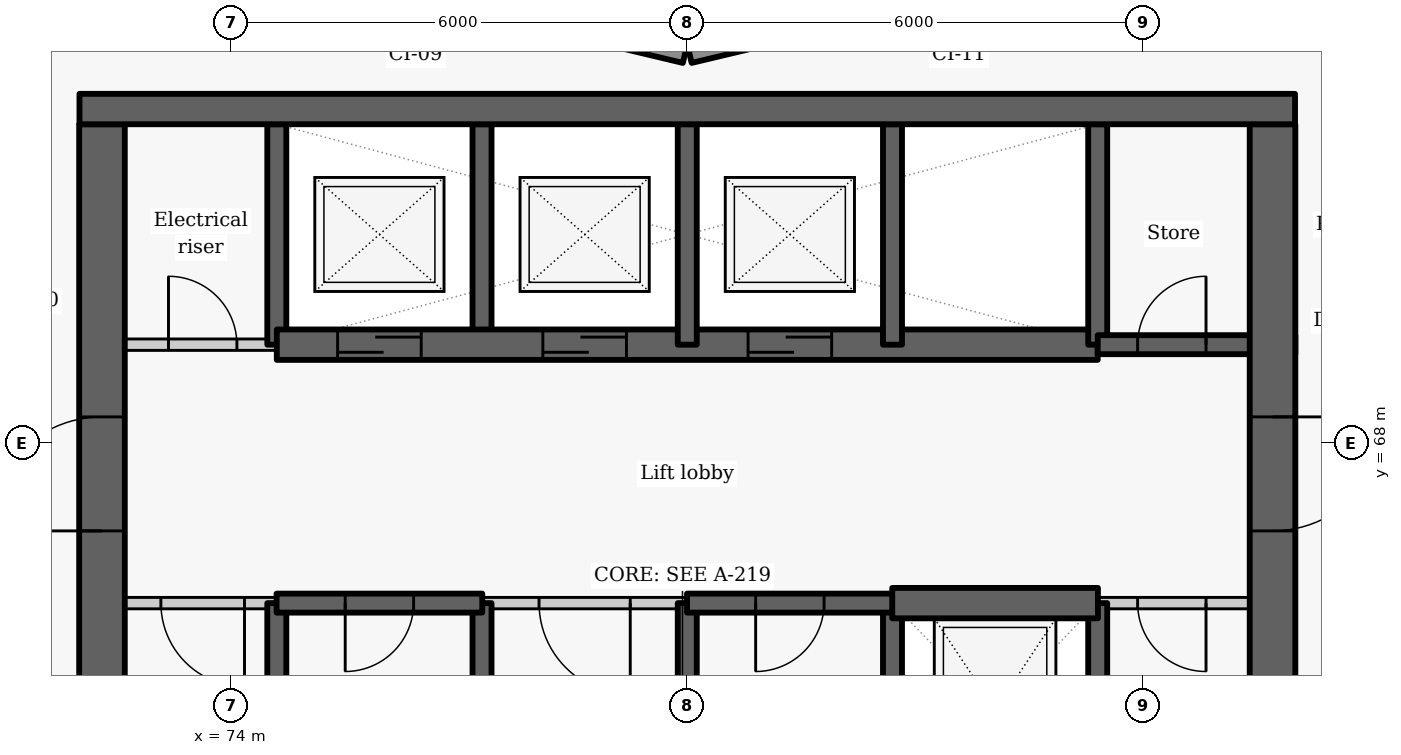
"""IFC4 building model, lengths in metres.
Left out: names, types, materials, properties, quantities, classifications, styles, units other than length and angle.
Written with IfcOpenShell. Run it as: python <this file> out.ifc"""

import sys

from ifc_helpers import new_model, si_unit, direction, frame, frame_2d, origin, place, context, subcontext, project, spatial, rectangle, extrude, element, fill, save


model = new_model("IFC4")
c1 = context("Model", 3, precision=1e-05, world=origin(), true_north=direction((0.0, 1.0)))
c2 = subcontext(c1, "Body", "Model", "MODEL_VIEW")
j1 = project(units=[si_unit("LENGTHUNIT", "METRE"), si_unit("PLANEANGLEUNIT", "RADIAN")], contexts=[c1])
p1 = place(None, origin())
s1 = spatial("IfcSite", under=j1, at=p1, CompositionType="ELEMENT")
p2 = place(p1, origin())
s2 = spatial("IfcBuilding", under=s1, at=p2, CompositionType="ELEMENT")
p3 = place(p2, frame((0.0, 0.0, 97.5)))
s3 = spatial("IfcBuildingStorey", under=s2, at=p3, CompositionType="ELEMENT", Elevation=97.5)
for number, where, z_axis, x_axis in (
    (1, (83.186, 73.881, 0.0), (0.0, 0.0, 1.0), (-0.973, -0.232, 0.0)),
    (2, (79.971, 73.128, 0.0), (0.0, 0.0, 1.0), (-0.973, 0.232, 0.0)),
):
    element("IfcWall", number, at=place(p3, frame(where, z_axis=z_axis, x_axis=x_axis)), inside=s3, PredefinedType="SOLIDWALL", context=c2, shape_type="SweptSolid", body=[
        extrude(rectangle(XDim=3.246, YDim=0.25, at=frame_2d((1.623, 0.0))), origin(), (0.0, 0.0, 1.0), 2.425),
    ])
p4 = place(p3, frame((74.6, 63.1, -0.275), z_axis=(0.0, 0.0, 1.0), x_axis=(0.0, 1.0, 0.0)))
e3 = element("IfcWall", 3, at=p4, inside=s3, PredefinedType="SHEAR", context=c2, shape_type="SweptSolid", body=[
    extrude(rectangle(XDim=2.8, YDim=0.25, at=frame_2d((1.4, 0.0))), origin(), (0.0, 0.0, 1.0), 3.3),
])
p5 = place(p3, frame((74.6, 69.3, -0.275), z_axis=(0.0, 0.0, 1.0), x_axis=(0.0, 1.0, 0.0)))
e4 = element("IfcWall", 4, at=p5, inside=s3, PredefinedType="SHEAR", context=c2, shape_type="SweptSolid", body=[
    extrude(rectangle(XDim=2.9, YDim=0.25, at=frame_2d((1.45, 0.0))), origin(), (0.0, 0.0, 1.0), 3.3),
])
p6 = place(p3, frame((72.0, 69.3, 0.0), z_axis=(0.0, 0.0, 1.0), x_axis=(1.0, 0.0, 0.0)))
e5 = element("IfcWall", 5, at=p6, inside=s3, PredefinedType="PARTITIONING", context=c2, shape_type="SweptSolid", body=[
    extrude(rectangle(XDim=2.6, YDim=0.15, at=frame_2d((1.3, 0.0))), origin(), (0.0, 0.0, 1.0), 3.025),
])
p7 = place(p6, frame((1.175, 0.0, 0.0)))
e6 = element("IfcOpeningElement", 6, at=p7, cuts=e5, PredefinedType="OPENING", context=c2, shape_type="SweptSolid", body=[
    extrude(rectangle(XDim=0.9, YDim=2.1, at=frame_2d((0.45, 1.05))), frame((0.0, 0.085, 0.0), z_axis=(0.0, -1.0, 0.0), x_axis=(1.0, 0.0, 0.0)), (0.0, 0.0, 1.0), 0.17),
])
p8 = place(p3, frame((72.3, 63.1, -0.275), z_axis=(0.0, 0.0, 1.0), x_axis=(0.0, 1.0, 0.0)))
e7 = element("IfcWall", 7, at=p8, inside=s3, PredefinedType="SHEAR", context=c2, shape_type="SweptSolid", body=[
    extrude(rectangle(XDim=9.1, YDim=0.6, at=frame_2d((4.55, 0.0))), origin(), (0.0, 0.0, 1.0), 3.3),
])
p9 = place(p8, frame((3.75, 0.0, 0.275)))
e8 = element("IfcOpeningElement", 8, at=p9, cuts=e7, PredefinedType="OPENING", context=c2, shape_type="SweptSolid", body=[
    extrude(rectangle(XDim=1.5, YDim=2.1, at=frame_2d((0.75, 1.05))), frame((0.0, 0.31, 0.0), z_axis=(0.0, -1.0, 0.0), x_axis=(1.0, 0.0, 0.0)), (0.0, 0.0, 1.0), 0.62),
])
p10 = place(p3, frame((77.3, 63.1, -0.275), z_axis=(0.0, 0.0, 1.0), x_axis=(0.0, 1.0, 0.0)))
e9 = element("IfcWall", 9, at=p10, inside=s3, PredefinedType="SHEAR", context=c2, shape_type="SweptSolid", body=[
    extrude(rectangle(XDim=2.8, YDim=0.25, at=frame_2d((1.4, 0.0))), origin(), (0.0, 0.0, 1.0), 3.3),
])
p11 = place(p3, frame((77.3, 69.3, -0.275), z_axis=(0.0, 0.0, 1.0), x_axis=(0.0, 1.0, 0.0)))
e10 = element("IfcWall", 10, at=p11, inside=s3, PredefinedType="SHEAR", context=c2, shape_type="SweptSolid", body=[
    extrude(rectangle(XDim=2.9, YDim=0.25, at=frame_2d((1.45, 0.0))), origin(), (0.0, 0.0, 1.0), 3.3),
])
p12 = place(p3, frame((74.6, 69.3, -0.275), z_axis=(0.0, 0.0, 1.0), x_axis=(1.0, 0.0, 0.0)))
e11 = element("IfcWall", 11, at=p12, inside=s3, PredefinedType="SHEAR", context=c2, shape_type="SweptSolid", body=[
    extrude(rectangle(XDim=10.8, YDim=0.4, at=frame_2d((5.4, 0.0))), origin(), (0.0, 0.0, 1.0), 3.3),
])
p13 = place(p12, frame((0.8, 0.0, 0.275)))
e12 = element("IfcOpeningElement", 12, at=p13, cuts=e11, PredefinedType="OPENING", context=c2, shape_type="SweptSolid", body=[
    extrude(rectangle(XDim=1.1, YDim=2.1, at=frame_2d((0.55, 1.05))), frame((0.0, 0.21, 0.0), z_axis=(0.0, -1.0, 0.0), x_axis=(1.0, 0.0, 0.0)), (0.0, 0.0, 1.0), 0.42),
])
p14 = place(p12, frame((3.5, 0.0, 0.275)))
e13 = element("IfcOpeningElement", 13, at=p14, cuts=e11, PredefinedType="OPENING", context=c2, shape_type="SweptSolid", body=[
    extrude(rectangle(XDim=1.1, YDim=2.1, at=frame_2d((0.55, 1.05))), frame((0.0, 0.21, 0.0), z_axis=(0.0, -1.0, 0.0), x_axis=(1.0, 0.0, 0.0)), (0.0, 0.0, 1.0), 0.42),
])
p15 = place(p12, frame((6.2, 0.0, 0.275)))
e14 = element("IfcOpeningElement", 14, at=p15, cuts=e11, PredefinedType="OPENING", context=c2, shape_type="SweptSolid", body=[
    extrude(rectangle(XDim=1.1, YDim=2.1, at=frame_2d((0.55, 1.05))), frame((0.0, 0.21, 0.0), z_axis=(0.0, -1.0, 0.0), x_axis=(1.0, 0.0, 0.0)), (0.0, 0.0, 1.0), 0.42),
])
p16 = place(p3, frame((80.0, 63.1, -0.275), z_axis=(0.0, 0.0, 1.0), x_axis=(0.0, 1.0, 0.0)))
e15 = element("IfcWall", 15, at=p16, inside=s3, PredefinedType="SHEAR", context=c2, shape_type="SweptSolid", body=[
    extrude(rectangle(XDim=2.8, YDim=0.25, at=frame_2d((1.4, 0.0))), origin(), (0.0, 0.0, 1.0), 3.3),
])
p17 = place(p3, frame((80.0, 69.3, -0.275), z_axis=(0.0, 0.0, 1.0), x_axis=(0.0, 1.0, 0.0)))
e16 = element("IfcWall", 16, at=p17, inside=s3, PredefinedType="SHEAR", context=c2, shape_type="SweptSolid", body=[
    extrude(rectangle(XDim=2.9, YDim=0.25, at=frame_2d((1.45, 0.0))), origin(), (0.0, 0.0, 1.0), 3.3),
])
p18 = place(p3, frame((82.7, 63.1, -0.275), z_axis=(0.0, 0.0, 1.0), x_axis=(0.0, 1.0, 0.0)))
e17 = element("IfcWall", 17, at=p18, inside=s3, PredefinedType="SHEAR", context=c2, shape_type="SweptSolid", body=[
    extrude(rectangle(XDim=2.8, YDim=0.25, at=frame_2d((1.4, 0.0))), origin(), (0.0, 0.0, 1.0), 3.3),
])
p19 = place(p3, frame((82.7, 69.3, -0.275), z_axis=(0.0, 0.0, 1.0), x_axis=(0.0, 1.0, 0.0)))
e18 = element("IfcWall", 18, at=p19, inside=s3, PredefinedType="SHEAR", context=c2, shape_type="SweptSolid", body=[
    extrude(rectangle(XDim=2.9, YDim=0.25, at=frame_2d((1.45, 0.0))), origin(), (0.0, 0.0, 1.0), 3.3),
])
p20 = place(p3, frame((85.4, 63.1, -0.275), z_axis=(0.0, 0.0, 1.0), x_axis=(0.0, 1.0, 0.0)))
e19 = element("IfcWall", 19, at=p20, inside=s3, PredefinedType="SHEAR", context=c2, shape_type="SweptSolid", body=[
    extrude(rectangle(XDim=2.8, YDim=0.25, at=frame_2d((1.4, 0.0))), origin(), (0.0, 0.0, 1.0), 3.3),
])
p21 = place(p3, frame((85.4, 69.3, -0.275), z_axis=(0.0, 0.0, 1.0), x_axis=(0.0, 1.0, 0.0)))
e20 = element("IfcWall", 20, at=p21, inside=s3, PredefinedType="SHEAR", context=c2, shape_type="SweptSolid", body=[
    extrude(rectangle(XDim=2.9, YDim=0.25, at=frame_2d((1.45, 0.0))), origin(), (0.0, 0.0, 1.0), 3.3),
])
p22 = place(p3, frame((85.4, 69.3, -0.275), z_axis=(0.0, 0.0, 1.0), x_axis=(1.0, 0.0, 0.0)))
e21 = element("IfcWall", 21, at=p22, inside=s3, PredefinedType="SHEAR", context=c2, shape_type="SweptSolid", body=[
    extrude(rectangle(XDim=2.6, YDim=0.25, at=frame_2d((1.3, 0.0))), origin(), (0.0, 0.0, 1.0), 3.3),
])
p23 = place(p22, frame((0.525, 0.0, 0.275)))
e22 = element("IfcOpeningElement", 22, at=p23, cuts=e21, PredefinedType="OPENING", context=c2, shape_type="SweptSolid", body=[
    extrude(rectangle(XDim=0.9, YDim=2.1, at=frame_2d((0.45, 1.05))), frame((0.0, 0.135, 0.0), z_axis=(0.0, -1.0, 0.0), x_axis=(1.0, 0.0, 0.0)), (0.0, 0.0, 1.0), 0.27),
])
p24 = place(p3, frame((87.7, 72.2, -0.275), z_axis=(0.0, 0.0, 1.0), x_axis=(0.0, -1.0, 0.0)))
e23 = element("IfcWall", 23, at=p24, inside=s3, PredefinedType="SHEAR", context=c2, shape_type="SweptSolid", body=[
    extrude(rectangle(XDim=15.6, YDim=0.6, at=frame_2d((7.8, 0.0))), origin(), (0.0, 0.0, 1.0), 3.3),
])
p25 = place(p24, frame((3.85, 0.0, 0.275)))
e24 = element("IfcOpeningElement", 24, at=p25, cuts=e23, PredefinedType="OPENING", context=c2, shape_type="SweptSolid", body=[
    extrude(rectangle(XDim=1.5, YDim=2.1, at=frame_2d((0.75, 1.05))), frame((0.0, 0.31, 0.0), z_axis=(0.0, -1.0, 0.0), x_axis=(1.0, 0.0, 0.0)), (0.0, 0.0, 1.0), 0.62),
])
p26 = place(p24, frame((11.8, 0.0, 0.275)))
e25 = element("IfcOpeningElement", 25, at=p26, cuts=e23, PredefinedType="OPENING", context=c2, shape_type="SweptSolid", body=[
    extrude(rectangle(XDim=1.1, YDim=2.1, at=frame_2d((0.55, 1.05))), frame((0.0, 0.31, 0.0), z_axis=(0.0, -1.0, 0.0), x_axis=(1.0, 0.0, 0.0)), (0.0, 0.0, 1.0), 0.62),
])
p27 = place(p3, frame((74.603, 65.9, 0.0), z_axis=(0.0, 0.0, 1.0), x_axis=(-1.0, 0.0, 0.0)))
e26 = element("IfcWall", 26, at=p27, inside=s3, PredefinedType="PARTITIONING", context=c2, shape_type="SweptSolid", body=[
    extrude(rectangle(XDim=2.603, YDim=0.15, at=frame_2d((1.302, 0.0))), origin(), (0.0, 0.0, 1.0), 3.025),
])
p28 = place(p27, frame((0.428, 0.0, 0.0)))
e27 = element("IfcOpeningElement", 27, at=p28, cuts=e26, PredefinedType="OPENING", context=c2, shape_type="SweptSolid", body=[
    extrude(rectangle(XDim=1.1, YDim=2.1, at=frame_2d((0.55, 1.05))), frame((0.0, 0.085, 0.0), z_axis=(0.0, -1.0, 0.0), x_axis=(1.0, 0.0, 0.0)), (0.0, 0.0, 1.0), 0.17),
])
p29 = place(p3, frame((80.003, 65.9, 0.0), z_axis=(0.0, 0.0, 1.0), x_axis=(-1.0, 0.0, 0.0)))
e28 = element("IfcWall", 28, at=p29, inside=s3, PredefinedType="PARTITIONING", context=c2, shape_type="SweptSolid", body=[
    extrude(rectangle(XDim=2.706, YDim=0.15, at=frame_2d((1.353, 0.0))), origin(), (0.0, 0.0, 1.0), 3.025),
])
p30 = place(p29, frame((0.753, 0.0, 0.0)))
e29 = element("IfcOpeningElement", 29, at=p30, cuts=e28, PredefinedType="OPENING", context=c2, shape_type="SweptSolid", body=[
    extrude(rectangle(XDim=1.2, YDim=2.1, at=frame_2d((0.6, 1.05))), frame((0.0, 0.085, 0.0), z_axis=(0.0, -1.0, 0.0), x_axis=(1.0, 0.0, 0.0)), (0.0, 0.0, 1.0), 0.17),
])
p31 = place(p3, frame((88.0, 65.9, 0.0), z_axis=(0.0, 0.0, 1.0), x_axis=(-1.0, 0.0, 0.0)))
e30 = element("IfcWall", 30, at=p31, inside=s3, PredefinedType="PARTITIONING", context=c2, shape_type="SweptSolid", body=[
    extrude(rectangle(XDim=2.603, YDim=0.15, at=frame_2d((1.302, 0.0))), origin(), (0.0, 0.0, 1.0), 3.025),
])
p32 = place(p31, frame((1.175, 0.0, 0.0)))
e31 = element("IfcOpeningElement", 31, at=p32, cuts=e30, PredefinedType="OPENING", context=c2, shape_type="SweptSolid", body=[
    extrude(rectangle(XDim=0.9, YDim=2.1, at=frame_2d((0.45, 1.05))), frame((0.0, 0.085, 0.0), z_axis=(0.0, -1.0, 0.0), x_axis=(1.0, 0.0, 0.0)), (0.0, 0.0, 1.0), 0.17),
])
p33 = place(p3, frame((77.303, 65.9, -0.275), z_axis=(0.0, 0.0, 1.0), x_axis=(-1.0, 0.0, 0.0)))
e32 = element("IfcWall", 32, at=p33, inside=s3, PredefinedType="SHEAR", context=c2, shape_type="SweptSolid", body=[
    extrude(rectangle(XDim=2.706, YDim=0.25, at=frame_2d((1.353, 0.0))), origin(), (0.0, 0.0, 1.0), 3.3),
])
p34 = place(p33, frame((0.903, 0.0, 0.275)))
e33 = element("IfcOpeningElement", 33, at=p34, cuts=e32, PredefinedType="OPENING", context=c2, shape_type="SweptSolid", body=[
    extrude(rectangle(XDim=0.9, YDim=2.1, at=frame_2d((0.45, 1.05))), frame((0.0, 0.135, 0.0), z_axis=(0.0, -1.0, 0.0), x_axis=(1.0, 0.0, 0.0)), (0.0, 0.0, 1.0), 0.27),
])
p35 = place(p3, frame((82.703, 65.9, -0.275), z_axis=(0.0, 0.0, 1.0), x_axis=(-1.0, 0.0, 0.0)))
e34 = element("IfcWall", 34, at=p35, inside=s3, PredefinedType="SHEAR", context=c2, shape_type="SweptSolid", body=[
    extrude(rectangle(XDim=2.706, YDim=0.25, at=frame_2d((1.353, 0.0))), origin(), (0.0, 0.0, 1.0), 3.3),
])
p36 = place(p35, frame((0.903, 0.0, 0.275)))
e35 = element("IfcOpeningElement", 35, at=p36, cuts=e34, PredefinedType="OPENING", context=c2, shape_type="SweptSolid", body=[
    extrude(rectangle(XDim=0.9, YDim=2.1, at=frame_2d((0.45, 1.05))), frame((0.0, 0.135, 0.0), z_axis=(0.0, -1.0, 0.0), x_axis=(1.0, 0.0, 0.0)), (0.0, 0.0, 1.0), 0.27),
])
p37 = place(p3, frame((82.697, 65.9, -0.275), z_axis=(0.0, 0.0, 1.0), x_axis=(1.0, 0.0, 0.0)))
e36 = element("IfcWall", 36, at=p37, inside=s3, PredefinedType="SHEAR", context=c2, shape_type="SweptSolid", body=[
    extrude(rectangle(XDim=2.706, YDim=0.4, at=frame_2d((1.353, 0.0))), origin(), (0.0, 0.0, 1.0), 3.3),
])
p38 = place(p3, frame((72.004, 72.4, -0.275), z_axis=(0.0, 0.0, 1.0), x_axis=(1.0, 0.0, 0.0)))
e37 = element("IfcWall", 37, at=p38, inside=s3, PredefinedType="SHEAR", context=c2, shape_type="SweptSolid", body=[
    extrude(rectangle(XDim=15.992, YDim=0.4, at=frame_2d((7.996, 0.0))), origin(), (0.0, 0.0, 1.0), 3.3),
])
p39 = place(p7, origin())
e38 = element("IfcDoor", 38, at=p39, inside=s3, OperationType="SINGLE_SWING_LEFT", PredefinedType="DOOR", context=c2, shape_type="SweptSolid", body=[
    extrude(rectangle(XDim=0.9, YDim=2.1, at=frame_2d((0.45, 1.05))), frame((0.0, 0.025, 0.0), z_axis=(0.0, -1.0, 0.0), x_axis=(1.0, 0.0, 0.0)), (0.0, 0.0, 1.0), 0.05),
])
fill(e6, e38)
p40 = place(p13, origin())
e39 = element("IfcDoor", 39, at=p40, inside=s3, OperationType="SLIDING_TO_LEFT", PredefinedType="DOOR", context=c2, shape_type="SweptSolid", body=[
    extrude(rectangle(XDim=1.1, YDim=2.1, at=frame_2d((0.55, 1.05))), frame((0.0, 0.025, 0.0), z_axis=(0.0, -1.0, 0.0), x_axis=(1.0, 0.0, 0.0)), (0.0, 0.0, 1.0), 0.05),
])
fill(e12, e39)
p41 = place(p14, origin())
e40 = element("IfcDoor", 40, at=p41, inside=s3, OperationType="SLIDING_TO_LEFT", PredefinedType="DOOR", context=c2, shape_type="SweptSolid", body=[
    extrude(rectangle(XDim=1.1, YDim=2.1, at=frame_2d((0.55, 1.05))), frame((0.0, 0.025, 0.0), z_axis=(0.0, -1.0, 0.0), x_axis=(1.0, 0.0, 0.0)), (0.0, 0.0, 1.0), 0.05),
])
fill(e13, e40)
p42 = place(p15, origin())
e41 = element("IfcDoor", 41, at=p42, inside=s3, OperationType="SLIDING_TO_LEFT", PredefinedType="DOOR", context=c2, shape_type="SweptSolid", body=[
    extrude(rectangle(XDim=1.1, YDim=2.1, at=frame_2d((0.55, 1.05))), frame((0.0, 0.025, 0.0), z_axis=(0.0, -1.0, 0.0), x_axis=(1.0, 0.0, 0.0)), (0.0, 0.0, 1.0), 0.05),
])
fill(e14, e41)
p43 = place(p23, origin())
e42 = element("IfcDoor", 42, at=p43, inside=s3, OperationType="SINGLE_SWING_RIGHT", PredefinedType="DOOR", context=c2, shape_type="SweptSolid", body=[
    extrude(rectangle(XDim=0.9, YDim=2.1, at=frame_2d((0.45, 1.05))), frame((0.0, 0.025, 0.0), z_axis=(0.0, -1.0, 0.0), x_axis=(1.0, 0.0, 0.0)), (0.0, 0.0, 1.0), 0.05),
])
fill(e22, e42)
p44 = place(p28, origin())
e43 = element("IfcDoor", 43, at=p44, inside=s3, OperationType="SINGLE_SWING_LEFT", PredefinedType="DOOR", context=c2, shape_type="SweptSolid", body=[
    extrude(rectangle(XDim=1.1, YDim=2.1, at=frame_2d((0.55, 1.05))), frame((0.0, 0.025, 0.0), z_axis=(0.0, -1.0, 0.0), x_axis=(1.0, 0.0, 0.0)), (0.0, 0.0, 1.0), 0.05),
])
fill(e27, e43)
p45 = place(p34, origin())
e44 = element("IfcDoor", 44, at=p45, inside=s3, OperationType="SINGLE_SWING_RIGHT", PredefinedType="DOOR", context=c2, shape_type="SweptSolid", body=[
    extrude(rectangle(XDim=0.9, YDim=2.1, at=frame_2d((0.45, 1.05))), frame((0.0, 0.025, 0.0), z_axis=(0.0, -1.0, 0.0), x_axis=(1.0, 0.0, 0.0)), (0.0, 0.0, 1.0), 0.05),
])
fill(e33, e44)
p46 = place(p30, origin())
e45 = element("IfcDoor", 45, at=p46, inside=s3, OperationType="DOUBLE_DOOR_SINGLE_SWING", PredefinedType="DOOR", context=c2, shape_type="SweptSolid", body=[
    extrude(rectangle(XDim=1.2, YDim=2.1, at=frame_2d((0.6, 1.05))), frame((0.0, 0.025, 0.0), z_axis=(0.0, -1.0, 0.0), x_axis=(1.0, 0.0, 0.0)), (0.0, 0.0, 1.0), 0.05),
])
fill(e29, e45)
p47 = place(p36, origin())
e46 = element("IfcDoor", 46, at=p47, inside=s3, OperationType="SINGLE_SWING_RIGHT", PredefinedType="DOOR", context=c2, shape_type="SweptSolid", body=[
    extrude(rectangle(XDim=0.9, YDim=2.1, at=frame_2d((0.45, 1.05))), frame((0.0, 0.025, 0.0), z_axis=(0.0, -1.0, 0.0), x_axis=(1.0, 0.0, 0.0)), (0.0, 0.0, 1.0), 0.05),
])
fill(e35, e46)
p48 = place(p32, origin())
e47 = element("IfcDoor", 47, at=p48, inside=s3, OperationType="SINGLE_SWING_LEFT", PredefinedType="DOOR", context=c2, shape_type="SweptSolid", body=[
    extrude(rectangle(XDim=0.9, YDim=2.1, at=frame_2d((0.45, 1.05))), frame((0.0, 0.025, 0.0), z_axis=(0.0, -1.0, 0.0), x_axis=(1.0, 0.0, 0.0)), (0.0, 0.0, 1.0), 0.05),
])
fill(e31, e47)
p49 = place(p25, origin())
e48 = element("IfcDoor", 48, at=p49, inside=s3, OperationType="DOUBLE_DOOR_SINGLE_SWING", PredefinedType="DOOR", context=c2, shape_type="SweptSolid", body=[
    extrude(rectangle(XDim=1.5, YDim=2.1, at=frame_2d((0.75, 1.05))), frame((0.0, 0.025, 0.0), z_axis=(0.0, -1.0, 0.0), x_axis=(1.0, 0.0, 0.0)), (0.0, 0.0, 1.0), 0.05),
])
fill(e24, e48)
p50 = place(p9, origin())
e49 = element("IfcDoor", 49, at=p50, inside=s3, OperationType="DOUBLE_DOOR_SINGLE_SWING", PredefinedType="DOOR", context=c2, shape_type="SweptSolid", body=[
    extrude(rectangle(XDim=1.5, YDim=2.1, at=frame_2d((0.75, 1.05))), frame((0.0, 0.025, 0.0), z_axis=(0.0, -1.0, 0.0), x_axis=(1.0, 0.0, 0.0)), (0.0, 0.0, 1.0), 0.05),
])
fill(e8, e49)
save(model, sys.argv[1])
